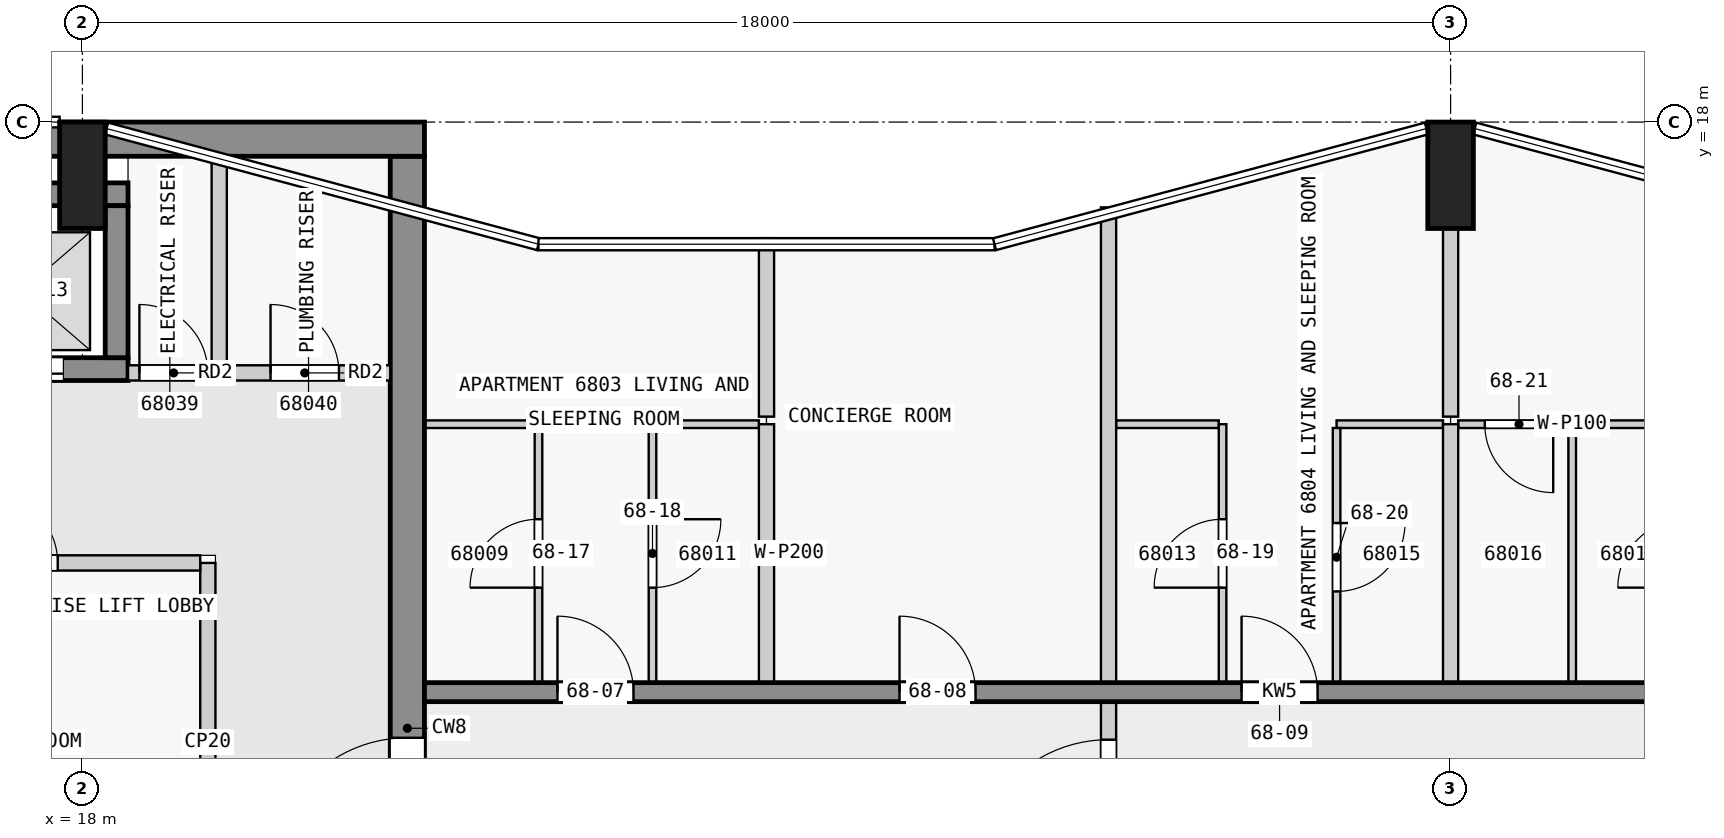
"""IFC4 building model, lengths in metres.
Left out: names, types, materials, properties, quantities, classifications, styles, units other than length and angle.
Written with IfcOpenShell. Run it as: python <this file> out.ifc"""

import sys

from ifc_helpers import new_model, si_unit, direction, frame, frame_2d, origin, origin_2d, place, context, subcontext, project, spatial, rectangle, extrude, element, fill, save


model = new_model("IFC4")
c1 = context("Model", 3, precision=1e-05, world=origin(), true_north=direction((0.0, 1.0)))
c2 = subcontext(c1, "Body", "Model", "MODEL_VIEW")
j1 = project(units=[si_unit("LENGTHUNIT", "METRE"), si_unit("PLANEANGLEUNIT", "RADIAN")], contexts=[c1])
p1 = place(None, origin())
s1 = spatial("IfcSite", under=j1, at=p1, CompositionType="ELEMENT")
p2 = place(p1, origin())
s2 = spatial("IfcBuilding", under=s1, at=p2, CompositionType="ELEMENT")
p3 = place(p2, frame((0.0, 0.0, 259.9)))
s3 = spatial("IfcBuildingStorey", under=s2, at=p3, CompositionType="ELEMENT", Elevation=259.9)
for number, where, z_axis, x_axis in (
    (1, (36.0, 17.3, 0.0), (0.0, 0.0, 1.0), (1.0, 0.0, 0.0)),
    (2, (18.0, 17.3, 0.0), (0.0, 0.0, 1.0), (1.0, 0.0, 0.0)),
):
    element("IfcColumn", number, at=place(p3, frame(where, z_axis=z_axis, x_axis=x_axis)), inside=s3, PredefinedType="COLUMN", context=c2, shape_type="SweptSolid", body=[
        extrude(rectangle(XDim=0.6, YDim=1.4, at=origin_2d()), origin(), (0.0, 0.0, 1.0), 3.5),
    ])
p4 = place(p3, frame((1.85, 17.775, 0.0), z_axis=(0.0, 0.0, 1.0), x_axis=(1.0, 0.0, 0.0)))
e3 = element("IfcWall", 3, at=p4, inside=s3, PredefinedType="SHEAR", context=c2, shape_type="SweptSolid", body=[
    extrude(rectangle(XDim=20.65, YDim=0.45, at=frame_2d((10.325, 0.0))), origin(), (0.0, 0.0, 1.0), 3.25),
])
p5 = place(p3, frame((22.275, 2.5, 0.0), z_axis=(0.0, 0.0, 1.0), x_axis=(0.0, 1.0, 0.0)))
e4 = element("IfcWall", 4, at=p5, inside=s3, PredefinedType="SHEAR", context=c2, shape_type="SweptSolid", body=[
    extrude(rectangle(XDim=15.05, YDim=0.45, at=frame_2d((7.525, 0.0))), origin(), (0.0, 0.0, 1.0), 3.25),
])
p6 = place(p5, frame((5.6, 0.0, 0.0)))
e5 = element("IfcOpeningElement", 5, at=p6, cuts=e4, PredefinedType="OPENING", context=c2, shape_type="SweptSolid", body=[
    extrude(rectangle(XDim=1.8, YDim=2.1, at=frame_2d((0.9, 1.05))), frame((0.0, 0.235, 0.0), z_axis=(0.0, -1.0, 0.0), x_axis=(1.0, 0.0, 0.0)), (0.0, 0.0, 1.0), 0.47),
])
p7 = place(p3, frame((10.8, 17.05, 0.0), z_axis=(0.0, 0.0, 1.0), x_axis=(1.0, 0.0, 0.0)))
e6 = element("IfcWall", 6, at=p7, inside=s3, PredefinedType="SHEAR", context=c2, shape_type="SweptSolid", body=[
    extrude(rectangle(XDim=7.8, YDim=0.3, at=frame_2d((3.9, 0.0))), origin(), (0.0, 0.0, 1.0), 3.25),
])
p8 = place(p3, frame((10.8, 14.75, 0.0), z_axis=(0.0, 0.0, 1.0), x_axis=(1.0, 0.0, 0.0)))
e7 = element("IfcWall", 7, at=p8, inside=s3, PredefinedType="SHEAR", context=c2, shape_type="SweptSolid", body=[
    extrude(rectangle(XDim=7.8, YDim=0.3, at=frame_2d((3.9, 0.0))), origin(), (0.0, 0.0, 1.0), 3.25),
])
p9 = place(p8, frame((0.85, 0.0, 0.0)))
e8 = element("IfcOpeningElement", 8, at=p9, cuts=e7, PredefinedType="OPENING", context=c2, shape_type="SweptSolid", body=[
    extrude(rectangle(XDim=1.1, YDim=2.1, at=frame_2d((0.55, 1.05))), frame((0.0, 0.16, 0.0), z_axis=(0.0, -1.0, 0.0), x_axis=(1.0, 0.0, 0.0)), (0.0, 0.0, 1.0), 0.32),
])
p10 = place(p8, frame((3.35, 0.0, 0.0)))
e9 = element("IfcOpeningElement", 9, at=p10, cuts=e7, PredefinedType="OPENING", context=c2, shape_type="SweptSolid", body=[
    extrude(rectangle(XDim=1.1, YDim=2.1, at=frame_2d((0.55, 1.05))), frame((0.0, 0.16, 0.0), z_axis=(0.0, -1.0, 0.0), x_axis=(1.0, 0.0, 0.0)), (0.0, 0.0, 1.0), 0.32),
])
p11 = place(p8, frame((5.85, 0.0, 0.0)))
e10 = element("IfcOpeningElement", 10, at=p11, cuts=e7, PredefinedType="OPENING", context=c2, shape_type="SweptSolid", body=[
    extrude(rectangle(XDim=1.1, YDim=2.1, at=frame_2d((0.55, 1.05))), frame((0.0, 0.16, 0.0), z_axis=(0.0, -1.0, 0.0), x_axis=(1.0, 0.0, 0.0)), (0.0, 0.0, 1.0), 0.32),
])
p12 = place(p3, frame((18.45, 14.9, 0.0), z_axis=(0.0, 0.0, 1.0), x_axis=(0.0, 1.0, 0.0)))
e11 = element("IfcWall", 11, at=p12, inside=s3, PredefinedType="SHEAR", context=c2, shape_type="SweptSolid", body=[
    extrude(rectangle(XDim=2.0, YDim=0.3, at=frame_2d((1.0, 0.0))), origin(), (0.0, 0.0, 1.0), 3.25),
])
p13 = place(p3, frame((22.5, 10.5, 0.0), z_axis=(0.0, 0.0, 1.0), x_axis=(1.0, 0.0, 0.0)))
e12 = element("IfcWall", 12, at=p13, inside=s3, PredefinedType="SHEAR", context=c2, shape_type="SweptSolid", body=[
    extrude(rectangle(XDim=22.5, YDim=0.25, at=frame_2d((11.25, 0.0))), origin(), (0.0, 0.0, 1.0), 3.25),
])
p14 = place(p13, frame((1.75, 0.0, 0.0)))
e13 = element("IfcOpeningElement", 13, at=p14, cuts=e12, PredefinedType="OPENING", context=c2, shape_type="SweptSolid", body=[
    extrude(rectangle(XDim=1.0, YDim=2.1, at=frame_2d((0.5, 1.05))), frame((0.0, 0.135, 0.0), z_axis=(0.0, -1.0, 0.0), x_axis=(1.0, 0.0, 0.0)), (0.0, 0.0, 1.0), 0.27),
])
p15 = place(p13, frame((6.25, 0.0, 0.0)))
e14 = element("IfcOpeningElement", 14, at=p15, cuts=e12, PredefinedType="OPENING", context=c2, shape_type="SweptSolid", body=[
    extrude(rectangle(XDim=1.0, YDim=2.1, at=frame_2d((0.5, 1.05))), frame((0.0, 0.135, 0.0), z_axis=(0.0, -1.0, 0.0), x_axis=(1.0, 0.0, 0.0)), (0.0, 0.0, 1.0), 0.27),
])
p16 = place(p13, frame((10.75, 0.0, 0.0)))
e15 = element("IfcOpeningElement", 15, at=p16, cuts=e12, PredefinedType="OPENING", context=c2, shape_type="SweptSolid", body=[
    extrude(rectangle(XDim=1.0, YDim=2.1, at=frame_2d((0.5, 1.05))), frame((0.0, 0.135, 0.0), z_axis=(0.0, -1.0, 0.0), x_axis=(1.0, 0.0, 0.0)), (0.0, 0.0, 1.0), 0.27),
])
p17 = place(p13, frame((16.85, 0.0, 0.0)))
e16 = element("IfcOpeningElement", 16, at=p17, cuts=e12, PredefinedType="OPENING", context=c2, shape_type="SweptSolid", body=[
    extrude(rectangle(XDim=1.0, YDim=2.1, at=frame_2d((0.5, 1.05))), frame((0.0, 0.135, 0.0), z_axis=(0.0, -1.0, 0.0), x_axis=(1.0, 0.0, 0.0)), (0.0, 0.0, 1.0), 0.27),
])
p18 = place(p3, frame((19.65, 7.5, 0.0), z_axis=(0.0, 0.0, 1.0), x_axis=(0.0, 1.0, 0.0)))
e17 = element("IfcWall", 17, at=p18, inside=s3, PredefinedType="PARTITIONING", context=c2, shape_type="SweptSolid", body=[
    extrude(rectangle(XDim=4.7, YDim=0.2, at=frame_2d((2.35, 0.0))), origin(), (0.0, 0.0, 1.0), 3.25),
])
p19 = place(p3, frame((10.9, 12.2, 0.0), z_axis=(0.0, 0.0, 1.0), x_axis=(1.0, 0.0, 0.0)))
e18 = element("IfcWall", 18, at=p19, inside=s3, PredefinedType="PARTITIONING", context=c2, shape_type="SweptSolid", body=[
    extrude(rectangle(XDim=8.65, YDim=0.2, at=frame_2d((4.325, 0.0))), origin(), (0.0, 0.0, 1.0), 3.25),
])
p20 = place(p19, frame((1.45, 0.0, 0.0)))
e19 = element("IfcOpeningElement", 19, at=p20, cuts=e18, PredefinedType="OPENING", context=c2, shape_type="SweptSolid", body=[
    extrude(rectangle(XDim=0.9, YDim=2.1, at=frame_2d((0.45, 1.05))), frame((0.0, 0.11, 0.0), z_axis=(0.0, -1.0, 0.0), x_axis=(1.0, 0.0, 0.0)), (0.0, 0.0, 1.0), 0.22),
])
p21 = place(p19, frame((5.875, 0.0, 0.0)))
e20 = element("IfcOpeningElement", 20, at=p21, cuts=e18, PredefinedType="OPENING", context=c2, shape_type="SweptSolid", body=[
    extrude(rectangle(XDim=0.9, YDim=2.1, at=frame_2d((0.45, 1.05))), frame((0.0, 0.11, 0.0), z_axis=(0.0, -1.0, 0.0), x_axis=(1.0, 0.0, 0.0)), (0.0, 0.0, 1.0), 0.22),
])
p22 = place(p3, frame((18.6, 14.7, 0.0), z_axis=(0.0, 0.0, 1.0), x_axis=(1.0, 0.0, 0.0)))
e21 = element("IfcWall", 21, at=p22, inside=s3, PredefinedType="PARTITIONING", context=c2, shape_type="SweptSolid", body=[
    extrude(rectangle(XDim=3.45, YDim=0.2, at=frame_2d((1.725, 0.0))), origin(), (0.0, 0.0, 1.0), 3.25),
])
p23 = place(p22, frame((0.15, 0.0, 0.0)))
e22 = element("IfcOpeningElement", 22, at=p23, cuts=e21, PredefinedType="OPENING", context=c2, shape_type="SweptSolid", body=[
    extrude(rectangle(XDim=0.9, YDim=2.1, at=frame_2d((0.45, 1.05))), frame((0.0, 0.11, 0.0), z_axis=(0.0, -1.0, 0.0), x_axis=(1.0, 0.0, 0.0)), (0.0, 0.0, 1.0), 0.22),
])
p24 = place(p22, frame((1.875, 0.0, 0.0)))
e23 = element("IfcOpeningElement", 23, at=p24, cuts=e21, PredefinedType="OPENING", context=c2, shape_type="SweptSolid", body=[
    extrude(rectangle(XDim=0.9, YDim=2.1, at=frame_2d((0.45, 1.05))), frame((0.0, 0.11, 0.0), z_axis=(0.0, -1.0, 0.0), x_axis=(1.0, 0.0, 0.0)), (0.0, 0.0, 1.0), 0.22),
])
p25 = place(p3, frame((19.8, 14.8, 0.0), z_axis=(0.0, 0.0, 1.0), x_axis=(0.0, 1.0, 0.0)))
e24 = element("IfcWall", 24, at=p25, inside=s3, PredefinedType="PARTITIONING", context=c2, shape_type="SweptSolid", body=[
    extrude(rectangle(XDim=2.75, YDim=0.2, at=frame_2d((1.375, 0.0))), origin(), (0.0, 0.0, 1.0), 3.25),
])
p26 = place(p3, frame((23.95, 14.025, 0.0), z_axis=(0.0, 0.0, 1.0), x_axis=(-1.0, 0.0, 0.0)))
e25 = element("IfcWall", 25, at=p26, inside=s3, PredefinedType="PARTITIONING", context=c2, shape_type="SweptSolid", body=[
    extrude(rectangle(XDim=1.45, YDim=0.1, at=frame_2d((0.725, 0.0))), origin(), (0.0, 0.0, 1.0), 3.25),
])
for number, where, z_axis, x_axis in (
    (26, (26.9, 14.025, 0.0), (0.0, 0.0, 1.0), (-1.0, 0.0, 0.0)),
    (27, (32.95, 14.025, 0.0), (0.0, 0.0, 1.0), (-1.0, 0.0, 0.0)),
):
    element("IfcWall", number, at=place(p3, frame(where, z_axis=z_axis, x_axis=x_axis)), inside=s3, PredefinedType="PARTITIONING", context=c2, shape_type="SweptSolid", body=[
        extrude(rectangle(XDim=1.35, YDim=0.1, at=frame_2d((0.675, 0.0))), origin(), (0.0, 0.0, 1.0), 3.25),
    ])
p27 = place(p3, frame((35.9, 14.025, 0.0), z_axis=(0.0, 0.0, 1.0), x_axis=(-1.0, 0.0, 0.0)))
e28 = element("IfcWall", 28, at=p27, inside=s3, PredefinedType="PARTITIONING", context=c2, shape_type="SweptSolid", body=[
    extrude(rectangle(XDim=1.4, YDim=0.1, at=frame_2d((0.7, 0.0))), origin(), (0.0, 0.0, 1.0), 3.25),
])
p28 = place(p3, frame((39.1, 14.025, 0.0), z_axis=(0.0, 0.0, 1.0), x_axis=(-1.0, 0.0, 0.0)))
e29 = element("IfcWall", 29, at=p28, inside=s3, PredefinedType="PARTITIONING", context=c2, shape_type="SweptSolid", body=[
    extrude(rectangle(XDim=3.0, YDim=0.1, at=frame_2d((1.5, 0.0))), origin(), (0.0, 0.0, 1.0), 3.25),
])
p29 = place(p28, frame((1.75, 0.0, 0.0)))
e30 = element("IfcOpeningElement", 30, at=p29, cuts=e29, PredefinedType="OPENING", context=c2, shape_type="SweptSolid", body=[
    extrude(rectangle(XDim=0.9, YDim=2.1, at=frame_2d((0.45, 1.05))), frame((0.0, 0.06, 0.0), z_axis=(0.0, -1.0, 0.0), x_axis=(1.0, 0.0, 0.0)), (0.0, 0.0, 1.0), 0.12),
])
p30 = place(p3, frame((24.0, 10.625, 0.0), z_axis=(0.0, 0.0, 1.0), x_axis=(0.0, 1.0, 0.0)))
e31 = element("IfcWall", 31, at=p30, inside=s3, PredefinedType="PARTITIONING", context=c2, shape_type="SweptSolid", body=[
    extrude(rectangle(XDim=3.4, YDim=0.1, at=frame_2d((1.7, 0.0))), origin(), (0.0, 0.0, 1.0), 3.25),
])
p31 = place(p30, frame((1.25, 0.0, 0.0)))
e32 = element("IfcOpeningElement", 32, at=p31, cuts=e31, PredefinedType="OPENING", context=c2, shape_type="SweptSolid", body=[
    extrude(rectangle(XDim=0.9, YDim=2.1, at=frame_2d((0.45, 1.05))), frame((0.0, 0.06, 0.0), z_axis=(0.0, -1.0, 0.0), x_axis=(1.0, 0.0, 0.0)), (0.0, 0.0, 1.0), 0.12),
])
p32 = place(p3, frame((25.5, 14.025, 0.0), z_axis=(0.0, 0.0, 1.0), x_axis=(0.0, -1.0, 0.0)))
e33 = element("IfcWall", 33, at=p32, inside=s3, PredefinedType="PARTITIONING", context=c2, shape_type="SweptSolid", body=[
    extrude(rectangle(XDim=3.4, YDim=0.1, at=frame_2d((1.7, 0.0))), origin(), (0.0, 0.0, 1.0), 3.25),
])
p33 = place(p32, frame((1.25, 0.0, 0.0)))
e34 = element("IfcOpeningElement", 34, at=p33, cuts=e33, PredefinedType="OPENING", context=c2, shape_type="SweptSolid", body=[
    extrude(rectangle(XDim=0.9, YDim=2.1, at=frame_2d((0.45, 1.05))), frame((0.0, 0.06, 0.0), z_axis=(0.0, -1.0, 0.0), x_axis=(1.0, 0.0, 0.0)), (0.0, 0.0, 1.0), 0.12),
])
p34 = place(p3, frame((27.0, 16.473, 0.0), z_axis=(0.0, 0.0, 1.0), x_axis=(0.0, -1.0, 0.0)))
e35 = element("IfcWall", 35, at=p34, inside=s3, PredefinedType="PARTITIONING", context=c2, shape_type="SweptSolid", body=[
    extrude(rectangle(XDim=2.348, YDim=0.2, at=frame_2d((1.174, 0.0))), origin(), (0.0, 0.0, 1.0), 3.25),
])
p35 = place(p3, frame((27.0, 10.625, 0.0), z_axis=(0.0, 0.0, 1.0), x_axis=(0.0, 1.0, 0.0)))
e36 = element("IfcWall", 36, at=p35, inside=s3, PredefinedType="PARTITIONING", context=c2, shape_type="SweptSolid", body=[
    extrude(rectangle(XDim=3.4, YDim=0.2, at=frame_2d((1.7, 0.0))), origin(), (0.0, 0.0, 1.0), 3.25),
])
p36 = place(p3, frame((31.5, 10.625, 0.0), z_axis=(0.0, 0.0, 1.0), x_axis=(0.0, 1.0, 0.0)))
e37 = element("IfcWall", 37, at=p36, inside=s3, PredefinedType="PARTITIONING", context=c2, shape_type="SweptSolid", body=[
    extrude(rectangle(XDim=6.253, YDim=0.2, at=frame_2d((3.126, 0.0))), origin(), (0.0, 0.0, 1.0), 3.25),
])
p37 = place(p3, frame((33.0, 10.625, 0.0), z_axis=(0.0, 0.0, 1.0), x_axis=(0.0, 1.0, 0.0)))
e38 = element("IfcWall", 38, at=p37, inside=s3, PredefinedType="PARTITIONING", context=c2, shape_type="SweptSolid", body=[
    extrude(rectangle(XDim=3.4, YDim=0.1, at=frame_2d((1.7, 0.0))), origin(), (0.0, 0.0, 1.0), 3.25),
])
p38 = place(p37, frame((1.25, 0.0, 0.0)))
e39 = element("IfcOpeningElement", 39, at=p38, cuts=e38, PredefinedType="OPENING", context=c2, shape_type="SweptSolid", body=[
    extrude(rectangle(XDim=0.9, YDim=2.1, at=frame_2d((0.45, 1.05))), frame((0.0, 0.06, 0.0), z_axis=(0.0, -1.0, 0.0), x_axis=(1.0, 0.0, 0.0)), (0.0, 0.0, 1.0), 0.12),
])
p39 = place(p3, frame((34.5, 13.975, 0.0), z_axis=(0.0, 0.0, 1.0), x_axis=(0.0, -1.0, 0.0)))
e40 = element("IfcWall", 40, at=p39, inside=s3, PredefinedType="PARTITIONING", context=c2, shape_type="SweptSolid", body=[
    extrude(rectangle(XDim=3.35, YDim=0.1, at=frame_2d((1.675, 0.0))), origin(), (0.0, 0.0, 1.0), 3.25),
])
p40 = place(p39, frame((1.25, 0.0, 0.0)))
e41 = element("IfcOpeningElement", 41, at=p40, cuts=e40, PredefinedType="OPENING", context=c2, shape_type="SweptSolid", body=[
    extrude(rectangle(XDim=0.9, YDim=2.1, at=frame_2d((0.45, 1.05))), frame((0.0, 0.06, 0.0), z_axis=(0.0, -1.0, 0.0), x_axis=(1.0, 0.0, 0.0)), (0.0, 0.0, 1.0), 0.12),
])
p41 = place(p3, frame((36.0, 16.6, 0.0), z_axis=(0.0, 0.0, 1.0), x_axis=(0.0, -1.0, 0.0)))
e42 = element("IfcWall", 42, at=p41, inside=s3, PredefinedType="PARTITIONING", context=c2, shape_type="SweptSolid", body=[
    extrude(rectangle(XDim=2.475, YDim=0.2, at=frame_2d((1.238, 0.0))), origin(), (0.0, 0.0, 1.0), 3.25),
])
p42 = place(p3, frame((36.0, 10.625, 0.0), z_axis=(0.0, 0.0, 1.0), x_axis=(0.0, 1.0, 0.0)))
e43 = element("IfcWall", 43, at=p42, inside=s3, PredefinedType="PARTITIONING", context=c2, shape_type="SweptSolid", body=[
    extrude(rectangle(XDim=3.4, YDim=0.2, at=frame_2d((1.7, 0.0))), origin(), (0.0, 0.0, 1.0), 3.25),
])
p43 = place(p3, frame((37.6, 10.625, 0.0), z_axis=(0.0, 0.0, 1.0), x_axis=(0.0, 1.0, 0.0)))
e44 = element("IfcWall", 44, at=p43, inside=s3, PredefinedType="PARTITIONING", context=c2, shape_type="SweptSolid", body=[
    extrude(rectangle(XDim=3.35, YDim=0.1, at=frame_2d((1.675, 0.0))), origin(), (0.0, 0.0, 1.0), 3.25),
])
p44 = place(p3, frame((31.5, 7.475, 0.0), z_axis=(0.0, 0.0, 1.0), x_axis=(0.0, 1.0, 0.0)))
e45 = element("IfcWall", 45, at=p44, inside=s3, PredefinedType="PARTITIONING", context=c2, shape_type="SweptSolid", body=[
    extrude(rectangle(XDim=3.05, YDim=0.2, at=frame_2d((1.525, 0.0))), origin(), (0.0, 0.0, 1.0), 3.25),
])
p45 = place(p44, frame((0.6, 0.0, 0.0)))
e46 = element("IfcOpeningElement", 46, at=p45, cuts=e45, PredefinedType="OPENING", context=c2, shape_type="SweptSolid", body=[
    extrude(rectangle(XDim=1.8, YDim=2.1, at=frame_2d((0.9, 1.05))), frame((0.0, 0.11, 0.0), z_axis=(0.0, -1.0, 0.0), x_axis=(1.0, 0.0, 0.0)), (0.0, 0.0, 1.0), 0.22),
])
p46 = place(p21, origin())
e47 = element("IfcDoor", 47, at=p46, inside=s3, OperationType="SINGLE_SWING_LEFT", PredefinedType="DOOR", context=c2, shape_type="SweptSolid", body=[
    extrude(rectangle(XDim=0.9, YDim=2.1, at=frame_2d((0.45, 1.05))), frame((0.0, 0.025, 0.0), z_axis=(0.0, -1.0, 0.0), x_axis=(1.0, 0.0, 0.0)), (0.0, 0.0, 1.0), 0.05),
])
fill(e20, e47)
p47 = place(p11, origin())
e48 = element("IfcDoor", 48, at=p47, inside=s3, OperationType="DOUBLE_DOOR_SLIDING", PredefinedType="DOOR", context=c2, shape_type="SweptSolid", body=[
    extrude(rectangle(XDim=1.1, YDim=2.1, at=frame_2d((0.55, 1.05))), frame((0.0, 0.025, 0.0), z_axis=(0.0, -1.0, 0.0), x_axis=(1.0, 0.0, 0.0)), (0.0, 0.0, 1.0), 0.05),
])
fill(e10, e48)
p48 = place(p6, origin())
e49 = element("IfcDoor", 49, at=p48, inside=s3, OperationType="DOUBLE_DOOR_SINGLE_SWING", PredefinedType="DOOR", context=c2, shape_type="SweptSolid", body=[
    extrude(rectangle(XDim=1.8, YDim=2.1, at=frame_2d((0.9, 1.05))), frame((0.0, 0.025, 0.0), z_axis=(0.0, -1.0, 0.0), x_axis=(1.0, 0.0, 0.0)), (0.0, 0.0, 1.0), 0.05),
])
fill(e5, e49)
p49 = place(p23, origin())
e50 = element("IfcDoor", 50, at=p49, inside=s3, OperationType="SINGLE_SWING_LEFT", PredefinedType="DOOR", context=c2, shape_type="SweptSolid", body=[
    extrude(rectangle(XDim=0.9, YDim=2.1, at=frame_2d((0.45, 1.05))), frame((0.0, 0.025, 0.0), z_axis=(0.0, -1.0, 0.0), x_axis=(1.0, 0.0, 0.0)), (0.0, 0.0, 1.0), 0.05),
])
fill(e22, e50)
p50 = place(p24, origin())
e51 = element("IfcDoor", 51, at=p50, inside=s3, OperationType="SINGLE_SWING_LEFT", PredefinedType="DOOR", context=c2, shape_type="SweptSolid", body=[
    extrude(rectangle(XDim=0.9, YDim=2.1, at=frame_2d((0.45, 1.05))), frame((0.0, 0.025, 0.0), z_axis=(0.0, -1.0, 0.0), x_axis=(1.0, 0.0, 0.0)), (0.0, 0.0, 1.0), 0.05),
])
fill(e23, e51)
p51 = place(p14, origin())
e52 = element("IfcDoor", 52, at=p51, inside=s3, OperationType="SINGLE_SWING_LEFT", PredefinedType="DOOR", context=c2, shape_type="SweptSolid", body=[
    extrude(rectangle(XDim=1.0, YDim=2.1, at=frame_2d((0.5, 1.05))), frame((0.0, 0.025, 0.0), z_axis=(0.0, -1.0, 0.0), x_axis=(1.0, 0.0, 0.0)), (0.0, 0.0, 1.0), 0.05),
])
fill(e13, e52)
p52 = place(p15, origin())
e53 = element("IfcDoor", 53, at=p52, inside=s3, OperationType="SINGLE_SWING_LEFT", PredefinedType="DOOR", context=c2, shape_type="SweptSolid", body=[
    extrude(rectangle(XDim=1.0, YDim=2.1, at=frame_2d((0.5, 1.05))), frame((0.0, 0.025, 0.0), z_axis=(0.0, -1.0, 0.0), x_axis=(1.0, 0.0, 0.0)), (0.0, 0.0, 1.0), 0.05),
])
fill(e14, e53)
p53 = place(p16, origin())
e54 = element("IfcDoor", 54, at=p53, inside=s3, OperationType="SINGLE_SWING_LEFT", PredefinedType="DOOR", context=c2, shape_type="SweptSolid", body=[
    extrude(rectangle(XDim=1.0, YDim=2.1, at=frame_2d((0.5, 1.05))), frame((0.0, 0.025, 0.0), z_axis=(0.0, -1.0, 0.0), x_axis=(1.0, 0.0, 0.0)), (0.0, 0.0, 1.0), 0.05),
])
fill(e15, e54)
p54 = place(p45, origin())
e55 = element("IfcDoor", 55, at=p54, inside=s3, OperationType="SINGLE_SWING_LEFT", PredefinedType="DOOR", context=c2, shape_type="SweptSolid", body=[
    extrude(rectangle(XDim=1.8, YDim=2.1, at=frame_2d((0.9, 1.05))), frame((0.0, 0.025, 0.0), z_axis=(0.0, -1.0, 0.0), x_axis=(1.0, 0.0, 0.0)), (0.0, 0.0, 1.0), 0.05),
])
fill(e46, e55)
p55 = place(p31, origin())
e56 = element("IfcDoor", 56, at=p55, inside=s3, OperationType="SINGLE_SWING_LEFT", PredefinedType="DOOR", context=c2, shape_type="SweptSolid", body=[
    extrude(rectangle(XDim=0.9, YDim=2.1, at=frame_2d((0.45, 1.05))), frame((0.0, 0.025, 0.0), z_axis=(0.0, -1.0, 0.0), x_axis=(1.0, 0.0, 0.0)), (0.0, 0.0, 1.0), 0.05),
])
fill(e32, e56)
p56 = place(p33, origin())
e57 = element("IfcDoor", 57, at=p56, inside=s3, OperationType="SINGLE_SWING_LEFT", PredefinedType="DOOR", context=c2, shape_type="SweptSolid", body=[
    extrude(rectangle(XDim=0.9, YDim=2.1, at=frame_2d((0.45, 1.05))), frame((0.0, 0.025, 0.0), z_axis=(0.0, -1.0, 0.0), x_axis=(1.0, 0.0, 0.0)), (0.0, 0.0, 1.0), 0.05),
])
fill(e34, e57)
p57 = place(p38, origin())
e58 = element("IfcDoor", 58, at=p57, inside=s3, OperationType="SINGLE_SWING_LEFT", PredefinedType="DOOR", context=c2, shape_type="SweptSolid", body=[
    extrude(rectangle(XDim=0.9, YDim=2.1, at=frame_2d((0.45, 1.05))), frame((0.0, 0.025, 0.0), z_axis=(0.0, -1.0, 0.0), x_axis=(1.0, 0.0, 0.0)), (0.0, 0.0, 1.0), 0.05),
])
fill(e39, e58)
p58 = place(p40, origin())
e59 = element("IfcDoor", 59, at=p58, inside=s3, OperationType="SINGLE_SWING_RIGHT", PredefinedType="DOOR", context=c2, shape_type="SweptSolid", body=[
    extrude(rectangle(XDim=0.9, YDim=2.1, at=frame_2d((0.45, 1.05))), frame((0.0, 0.025, 0.0), z_axis=(0.0, -1.0, 0.0), x_axis=(1.0, 0.0, 0.0)), (0.0, 0.0, 1.0), 0.05),
])
fill(e41, e59)
p59 = place(p29, origin())
e60 = element("IfcDoor", 60, at=p59, inside=s3, OperationType="SINGLE_SWING_RIGHT", PredefinedType="DOOR", context=c2, shape_type="SweptSolid", body=[
    extrude(rectangle(XDim=0.9, YDim=2.1, at=frame_2d((0.45, 1.05))), frame((0.0, 0.025, 0.0), z_axis=(0.0, -1.0, 0.0), x_axis=(1.0, 0.0, 0.0)), (0.0, 0.0, 1.0), 0.05),
])
fill(e30, e60)
save(model, sys.argv[1])
